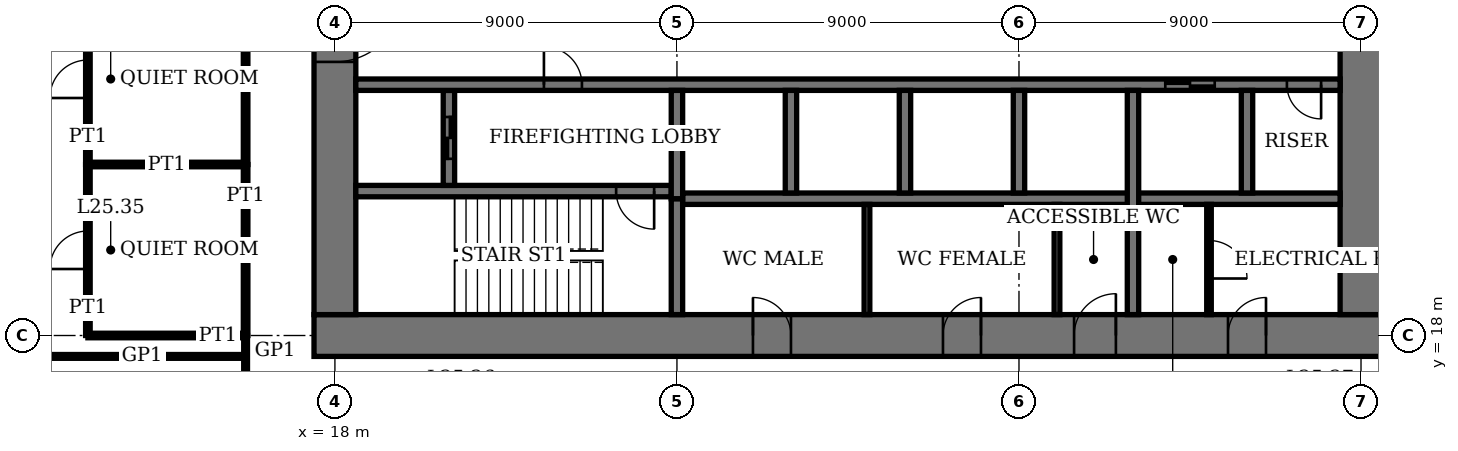
"""IFC4 building model, lengths in metres.
Left out: names, types, materials, properties, quantities, classifications, styles, units other than length and angle.
Written with IfcOpenShell. Run it as: python <this file> out.ifc"""

import sys

from ifc_helpers import new_model, si_unit, direction, frame, frame_2d, origin, place, context, subcontext, project, spatial, rectangle, extrude, element, fill, save


model = new_model("IFC4")
c1 = context("Model", 3, precision=1e-05, world=origin(), true_north=direction((0.0, 1.0)))
c2 = subcontext(c1, "Body", "Model", "MODEL_VIEW")
j1 = project(units=[si_unit("LENGTHUNIT", "METRE"), si_unit("PLANEANGLEUNIT", "RADIAN")], contexts=[c1])
p1 = place(None, origin())
s1 = spatial("IfcSite", under=j1, at=p1, CompositionType="ELEMENT")
p2 = place(p1, origin())
s2 = spatial("IfcBuilding", under=s1, at=p2, CompositionType="ELEMENT")
p3 = place(p2, frame((0.0, 0.0, 105.0)))
s3 = spatial("IfcBuildingStorey", under=s2, at=p3, CompositionType="ELEMENT", Elevation=105.0)
p4 = place(p3, frame((17.45, 18.0, 0.0), z_axis=(0.0, 0.0, 1.0), x_axis=(1.0, 0.0, 0.0)))
e1 = element("IfcWall", 1, at=p4, inside=s3, PredefinedType="SHEAR", context=c2, shape_type="SweptSolid", body=[
    extrude(rectangle(XDim=28.1, YDim=1.1, at=frame_2d((14.05, 0.0))), origin(), (0.0, 0.0, 1.0), 4.0),
])
p5 = place(p4, frame((11.55, 0.0, 0.0)))
e2 = element("IfcOpeningElement", 2, at=p5, cuts=e1, PredefinedType="OPENING", context=c2, shape_type="SweptSolid", body=[
    extrude(rectangle(XDim=1.0, YDim=2.4, at=frame_2d((0.5, 1.2))), frame((0.0, 0.56, 0.0), z_axis=(0.0, -1.0, 0.0), x_axis=(1.0, 0.0, 0.0)), (0.0, 0.0, 1.0), 1.12),
])
p6 = place(p4, frame((16.55, 0.0, 0.0)))
e3 = element("IfcOpeningElement", 3, at=p6, cuts=e1, PredefinedType="OPENING", context=c2, shape_type="SweptSolid", body=[
    extrude(rectangle(XDim=1.0, YDim=2.4, at=frame_2d((0.5, 1.2))), frame((0.0, 0.56, 0.0), z_axis=(0.0, -1.0, 0.0), x_axis=(1.0, 0.0, 0.0)), (0.0, 0.0, 1.0), 1.12),
])
p7 = place(p4, frame((20.0, 0.0, 0.0)))
e4 = element("IfcOpeningElement", 4, at=p7, cuts=e1, PredefinedType="OPENING", context=c2, shape_type="SweptSolid", body=[
    extrude(rectangle(XDim=1.1, YDim=2.4, at=frame_2d((0.55, 1.2))), frame((0.0, 0.56, 0.0), z_axis=(0.0, -1.0, 0.0), x_axis=(1.0, 0.0, 0.0)), (0.0, 0.0, 1.0), 1.12),
])
p8 = place(p4, frame((24.05, 0.0, 0.0)))
e5 = element("IfcOpeningElement", 5, at=p8, cuts=e1, PredefinedType="OPENING", context=c2, shape_type="SweptSolid", body=[
    extrude(rectangle(XDim=1.0, YDim=2.4, at=frame_2d((0.5, 1.2))), frame((0.0, 0.56, 0.0), z_axis=(0.0, -1.0, 0.0), x_axis=(1.0, 0.0, 0.0)), (0.0, 0.0, 1.0), 1.12),
])
p9 = place(p3, frame((18.0, 35.45, 0.0), z_axis=(0.0, 0.0, 1.0), x_axis=(0.0, -1.0, 0.0)))
e6 = element("IfcWall", 6, at=p9, inside=s3, PredefinedType="SHEAR", context=c2, shape_type="SweptSolid", body=[
    extrude(rectangle(XDim=16.9, YDim=1.1, at=frame_2d((8.45, 0.0))), origin(), (0.0, 0.0, 1.0), 4.0),
])
p10 = place(p9, frame((8.45, 0.0, 0.0)))
e7 = element("IfcOpeningElement", 7, at=p10, cuts=e6, PredefinedType="OPENING", context=c2, shape_type="SweptSolid", body=[
    extrude(rectangle(XDim=1.8, YDim=2.4, at=frame_2d((0.9, 1.2))), frame((0.0, 0.56, 0.0), z_axis=(0.0, -1.0, 0.0), x_axis=(1.0, 0.0, 0.0)), (0.0, 0.0, 1.0), 1.12),
])
p11 = place(p3, frame((45.0, 18.55, 0.0), z_axis=(0.0, 0.0, 1.0), x_axis=(0.0, 1.0, 0.0)))
e8 = element("IfcWall", 8, at=p11, inside=s3, PredefinedType="SHEAR", context=c2, shape_type="SweptSolid", body=[
    extrude(rectangle(XDim=16.9, YDim=1.1, at=frame_2d((8.45, 0.0))), origin(), (0.0, 0.0, 1.0), 4.0),
])
p12 = place(p11, frame((8.45, 0.0, 0.0)))
e9 = element("IfcOpeningElement", 9, at=p12, cuts=e8, PredefinedType="OPENING", context=c2, shape_type="SweptSolid", body=[
    extrude(rectangle(XDim=1.8, YDim=2.4, at=frame_2d((0.9, 1.2))), frame((0.0, 0.56, 0.0), z_axis=(0.0, -1.0, 0.0), x_axis=(1.0, 0.0, 0.0)), (0.0, 0.0, 1.0), 1.12),
])
p13 = place(p3, frame((18.55, 21.8, 0.0), z_axis=(0.0, 0.0, 1.0), x_axis=(1.0, 0.0, 0.0)))
e10 = element("IfcWall", 10, at=p13, inside=s3, PredefinedType="SHEAR", context=c2, shape_type="SweptSolid", body=[
    extrude(rectangle(XDim=8.3, YDim=0.3, at=frame_2d((4.15, 0.0))), origin(), (0.0, 0.0, 1.0), 4.0),
])
p14 = place(p13, frame((6.85, 0.0, 0.0)))
e11 = element("IfcOpeningElement", 11, at=p14, cuts=e10, PredefinedType="OPENING", context=c2, shape_type="SweptSolid", body=[
    extrude(rectangle(XDim=1.0, YDim=2.4, at=frame_2d((0.5, 1.2))), frame((0.0, 0.16, 0.0), z_axis=(0.0, -1.0, 0.0), x_axis=(1.0, 0.0, 0.0)), (0.0, 0.0, 1.0), 0.32),
])
p15 = place(p3, frame((27.0, 18.55, 0.0), z_axis=(0.0, 0.0, 1.0), x_axis=(0.0, 1.0, 0.0)))
e12 = element("IfcWall", 12, at=p15, inside=s3, PredefinedType="SHEAR", context=c2, shape_type="SweptSolid", body=[
    extrude(rectangle(XDim=3.05, YDim=0.3, at=frame_2d((1.525, 0.0))), origin(), (0.0, 0.0, 1.0), 4.0),
])
p16 = place(p3, frame((21.0, 21.95, 0.0), z_axis=(0.0, 0.0, 1.0), x_axis=(0.0, 1.0, 0.0)))
e13 = element("IfcWall", 13, at=p16, inside=s3, PredefinedType="SHEAR", context=c2, shape_type="SweptSolid", body=[
    extrude(rectangle(XDim=2.5, YDim=0.3, at=frame_2d((1.25, 0.0))), origin(), (0.0, 0.0, 1.0), 4.0),
])
p17 = place(p16, frame((0.7, 0.0, 0.0)))
e14 = element("IfcOpeningElement", 14, at=p17, cuts=e13, PredefinedType="OPENING", context=c2, shape_type="SweptSolid", body=[
    extrude(rectangle(XDim=1.1, YDim=2.4, at=frame_2d((0.55, 1.2))), frame((0.0, 0.16, 0.0), z_axis=(0.0, -1.0, 0.0), x_axis=(1.0, 0.0, 0.0)), (0.0, 0.0, 1.0), 0.32),
])
p18 = place(p3, frame((18.55, 24.6, 0.0), z_axis=(0.0, 0.0, 1.0), x_axis=(1.0, 0.0, 0.0)))
e15 = element("IfcWall", 15, at=p18, inside=s3, PredefinedType="SHEAR", context=c2, shape_type="SweptSolid", body=[
    extrude(rectangle(XDim=25.9, YDim=0.3, at=frame_2d((12.95, 0.0))), origin(), (0.0, 0.0, 1.0), 4.0),
])
p19 = place(p18, frame((4.95, 0.0, 0.0)))
e16 = element("IfcOpeningElement", 16, at=p19, cuts=e15, PredefinedType="OPENING", context=c2, shape_type="SweptSolid", body=[
    extrude(rectangle(XDim=1.0, YDim=2.4, at=frame_2d((0.5, 1.2))), frame((0.0, 0.16, 0.0), z_axis=(0.0, -1.0, 0.0), x_axis=(1.0, 0.0, 0.0)), (0.0, 0.0, 1.0), 0.32),
])
p20 = place(p18, frame((24.5, 0.0, 0.0)))
e17 = element("IfcOpeningElement", 17, at=p20, cuts=e15, PredefinedType="OPENING", context=c2, shape_type="SweptSolid", body=[
    extrude(rectangle(XDim=0.9, YDim=2.1, at=frame_2d((0.45, 1.05))), frame((0.0, 0.16, 0.0), z_axis=(0.0, -1.0, 0.0), x_axis=(1.0, 0.0, 0.0)), (0.0, 0.0, 1.0), 0.32),
])
p21 = place(p18, frame((21.3, 0.0, 0.0)))
e18 = element("IfcOpeningElement", 18, at=p21, cuts=e15, PredefinedType="OPENING", context=c2, shape_type="SweptSolid", body=[
    extrude(rectangle(XDim=1.3, YDim=2.4, at=frame_2d((0.65, 1.2))), frame((0.0, 0.16, 0.0), z_axis=(0.0, -1.0, 0.0), x_axis=(1.0, 0.0, 0.0)), (0.0, 0.0, 1.0), 0.32),
])
p22 = place(p3, frame((27.15, 21.6, 0.0), z_axis=(0.0, 0.0, 1.0), x_axis=(1.0, 0.0, 0.0)))
e19 = element("IfcWall", 19, at=p22, inside=s3, PredefinedType="SHEAR", context=c2, shape_type="SweptSolid", body=[
    extrude(rectangle(XDim=17.3, YDim=0.3, at=frame_2d((8.65, 0.0))), origin(), (0.0, 0.0, 1.0), 4.0),
])
for number, where, z_axis, x_axis in (
    (20, (30.0, 21.75, 0.0), (0.0, 0.0, 1.0), (0.0, 1.0, 0.0)),
    (21, (33.0, 21.75, 0.0), (0.0, 0.0, 1.0), (0.0, 1.0, 0.0)),
    (22, (36.0, 21.75, 0.0), (0.0, 0.0, 1.0), (0.0, 1.0, 0.0)),
):
    element("IfcWall", number, at=place(p3, frame(where, z_axis=z_axis, x_axis=x_axis)), inside=s3, PredefinedType="SHEAR", context=c2, shape_type="SweptSolid", body=[
        extrude(rectangle(XDim=2.7, YDim=0.3, at=frame_2d((1.35, 0.0))), origin(), (0.0, 0.0, 1.0), 4.0),
    ])
p23 = place(p3, frame((39.0, 18.55, 0.0), z_axis=(0.0, 0.0, 1.0), x_axis=(0.0, 1.0, 0.0)))
e23 = element("IfcWall", 23, at=p23, inside=s3, PredefinedType="SHEAR", context=c2, shape_type="SweptSolid", body=[
    extrude(rectangle(XDim=5.9, YDim=0.3, at=frame_2d((2.95, 0.0))), origin(), (0.0, 0.0, 1.0), 4.0),
])
p24 = place(p3, frame((42.0, 21.75, 0.0), z_axis=(0.0, 0.0, 1.0), x_axis=(0.0, 1.0, 0.0)))
e24 = element("IfcWall", 24, at=p24, inside=s3, PredefinedType="SHEAR", context=c2, shape_type="SweptSolid", body=[
    extrude(rectangle(XDim=2.7, YDim=0.3, at=frame_2d((1.35, 0.0))), origin(), (0.0, 0.0, 1.0), 4.0),
])
p25 = place(p3, frame((27.0, 21.6, 0.0), z_axis=(0.0, 0.0, 1.0), x_axis=(0.0, 1.0, 0.0)))
e25 = element("IfcWall", 25, at=p25, inside=s3, PredefinedType="SHEAR", context=c2, shape_type="SweptSolid", body=[
    extrude(rectangle(XDim=2.85, YDim=0.3, at=frame_2d((1.425, 0.0))), origin(), (0.0, 0.0, 1.0), 4.0),
])
p26 = place(p3, frame((10.0, 17.45, 0.0), z_axis=(0.0, 0.0, 1.0), x_axis=(1.0, 0.0, 0.0)))
e26 = element("IfcWall", 26, at=p26, inside=s3, PredefinedType="PARTITIONING", context=c2, shape_type="SweptSolid", body=[
    extrude(rectangle(XDim=5.65, YDim=0.1, at=frame_2d((2.825, 0.0))), origin(), (0.0, 0.0, 1.0), 3.75),
])
p27 = place(p3, frame((11.5, 18.0, 0.0), z_axis=(0.0, 0.0, 1.0), x_axis=(1.0, 0.0, 0.0)))
e27 = element("IfcWall", 27, at=p27, inside=s3, PredefinedType="PARTITIONING", context=c2, shape_type="SweptSolid", body=[
    extrude(rectangle(XDim=4.15, YDim=0.12, at=frame_2d((2.075, 0.0))), origin(), (0.0, 0.0, 1.0), 3.05),
])
p28 = place(p3, frame((11.5, 22.5, 0.0), z_axis=(0.0, 0.0, 1.0), x_axis=(1.0, 0.0, 0.0)))
e28 = element("IfcWall", 28, at=p28, inside=s3, PredefinedType="PARTITIONING", context=c2, shape_type="SweptSolid", body=[
    extrude(rectangle(XDim=4.15, YDim=0.12, at=frame_2d((2.075, 0.0))), origin(), (0.0, 0.0, 1.0), 3.1),
])
p29 = place(p3, frame((11.5, 18.0, 0.0), z_axis=(0.0, 0.0, 1.0), x_axis=(0.0, 1.0, 0.0)))
e29 = element("IfcWall", 29, at=p29, inside=s3, PredefinedType="PARTITIONING", context=c2, shape_type="SweptSolid", body=[
    extrude(rectangle(XDim=4.5, YDim=0.12, at=frame_2d((2.25, 0.0))), origin(), (0.0, 0.0, 1.0), 3.75),
])
p30 = place(p29, frame((1.75, 0.0, 0.0)))
e30 = element("IfcOpeningElement", 30, at=p30, cuts=e29, PredefinedType="OPENING", context=c2, shape_type="SweptSolid", body=[
    extrude(rectangle(XDim=1.0, YDim=2.4, at=frame_2d((0.5, 1.2))), frame((0.0, 0.07, 0.0), z_axis=(0.0, -1.0, 0.0), x_axis=(1.0, 0.0, 0.0)), (0.0, 0.0, 1.0), 0.14),
])
p31 = place(p3, frame((11.5, 22.5, 0.0), z_axis=(0.0, 0.0, 1.0), x_axis=(0.0, 1.0, 0.0)))
e31 = element("IfcWall", 31, at=p31, inside=s3, PredefinedType="PARTITIONING", context=c2, shape_type="SweptSolid", body=[
    extrude(rectangle(XDim=4.5, YDim=0.12, at=frame_2d((2.25, 0.0))), origin(), (0.0, 0.0, 1.0), 3.75),
])
p32 = place(p31, frame((1.75, 0.0, 0.0)))
e32 = element("IfcOpeningElement", 32, at=p32, cuts=e31, PredefinedType="OPENING", context=c2, shape_type="SweptSolid", body=[
    extrude(rectangle(XDim=1.0, YDim=2.4, at=frame_2d((0.5, 1.2))), frame((0.0, 0.07, 0.0), z_axis=(0.0, -1.0, 0.0), x_axis=(1.0, 0.0, 0.0)), (0.0, 0.0, 1.0), 0.14),
])
for number, where, z_axis, x_axis in (
    (33, (15.65, 18.0, 0.0), (0.0, 0.0, 1.0), (0.0, 1.0, 0.0)),
    (34, (15.65, 22.5, 0.0), (0.0, 0.0, 1.0), (0.0, 1.0, 0.0)),
):
    element("IfcWall", number, at=place(p3, frame(where, z_axis=z_axis, x_axis=x_axis)), inside=s3, PredefinedType="PARTITIONING", context=c2, shape_type="SweptSolid", body=[
        extrude(rectangle(XDim=4.5, YDim=0.12, at=frame_2d((2.25, 0.0))), origin(), (0.0, 0.0, 1.0), 3.75),
    ])
p33 = place(p3, frame((15.65, 15.65, 0.0), z_axis=(0.0, 0.0, 1.0), x_axis=(0.0, 1.0, 0.0)))
e35 = element("IfcWall", 35, at=p33, inside=s3, PredefinedType="PARTITIONING", context=c2, shape_type="SweptSolid", body=[
    extrude(rectangle(XDim=2.35, YDim=0.1, at=frame_2d((1.175, 0.0))), origin(), (0.0, 0.0, 1.0), 3.75),
])
for number, where, z_axis, x_axis in (
    (36, (32.0, 18.55, 0.0), (0.0, 0.0, 1.0), (0.0, 1.0, 0.0)),
    (37, (37.0, 18.55, 0.0), (0.0, 0.0, 1.0), (0.0, 1.0, 0.0)),
):
    element("IfcWall", number, at=place(p3, frame(where, z_axis=z_axis, x_axis=x_axis)), inside=s3, PredefinedType="PARTITIONING", context=c2, shape_type="SweptSolid", body=[
        extrude(rectangle(XDim=2.9, YDim=0.15, at=frame_2d((1.45, 0.0))), origin(), (0.0, 0.0, 1.0), 3.75),
    ])
p34 = place(p3, frame((41.0, 18.55, 0.0), z_axis=(0.0, 0.0, 1.0), x_axis=(0.0, 1.0, 0.0)))
e38 = element("IfcWall", 38, at=p34, inside=s3, PredefinedType="PARTITIONING", context=c2, shape_type="SweptSolid", body=[
    extrude(rectangle(XDim=2.9, YDim=0.12, at=frame_2d((1.45, 0.0))), origin(), (0.0, 0.0, 1.0), 3.75),
])
p35 = place(p34, frame((0.95, 0.0, 0.0)))
e39 = element("IfcOpeningElement", 39, at=p35, cuts=e38, PredefinedType="OPENING", context=c2, shape_type="SweptSolid", body=[
    extrude(rectangle(XDim=1.0, YDim=2.4, at=frame_2d((0.5, 1.2))), frame((0.0, 0.07, 0.0), z_axis=(0.0, -1.0, 0.0), x_axis=(1.0, 0.0, 0.0)), (0.0, 0.0, 1.0), 0.14),
])
p36 = place(p10, origin())
e40 = element("IfcDoor", 40, at=p36, inside=s3, OperationType="DOUBLE_DOOR_DOUBLE_SWING", PredefinedType="DOOR", context=c2, shape_type="SweptSolid", body=[
    extrude(rectangle(XDim=1.8, YDim=2.4, at=frame_2d((0.9, 1.2))), frame((0.0, 0.03, 0.0), z_axis=(0.0, -1.0, 0.0), x_axis=(1.0, 0.0, 0.0)), (0.0, 0.0, 1.0), 0.06),
    extrude(rectangle(XDim=0.04, YDim=2.4, at=frame_2d((0.02, 1.2))), frame((0.0, 0.55, 0.0), z_axis=(0.0, -1.0, 0.0), x_axis=(1.0, 0.0, 0.0)), (0.0, 0.0, 1.0), 1.1),
    extrude(rectangle(XDim=0.04, YDim=2.4, at=frame_2d((1.78, 1.2))), frame((0.0, 0.55, 0.0), z_axis=(0.0, -1.0, 0.0), x_axis=(1.0, 0.0, 0.0)), (0.0, 0.0, 1.0), 1.1),
    extrude(rectangle(XDim=1.8, YDim=0.04, at=frame_2d((0.9, 2.38))), frame((0.0, 0.55, 0.0), z_axis=(0.0, -1.0, 0.0), x_axis=(1.0, 0.0, 0.0)), (0.0, 0.0, 1.0), 1.1),
])
fill(e7, e40)
p37 = place(p5, origin())
e41 = element("IfcDoor", 41, at=p37, inside=s3, OperationType="SINGLE_SWING_RIGHT", PredefinedType="DOOR", context=c2, shape_type="SweptSolid", body=[
    extrude(rectangle(XDim=1.0, YDim=2.4, at=frame_2d((0.5, 1.2))), frame((0.0, 0.025, 0.0), z_axis=(0.0, -1.0, 0.0), x_axis=(1.0, 0.0, 0.0)), (0.0, 0.0, 1.0), 0.05),
    extrude(rectangle(XDim=0.04, YDim=2.4, at=frame_2d((0.02, 1.2))), frame((0.0, 0.4, 0.0), z_axis=(0.0, -1.0, 0.0), x_axis=(1.0, 0.0, 0.0)), (0.0, 0.0, 1.0), 0.8),
    extrude(rectangle(XDim=0.04, YDim=2.4, at=frame_2d((0.98, 1.2))), frame((0.0, 0.4, 0.0), z_axis=(0.0, -1.0, 0.0), x_axis=(1.0, 0.0, 0.0)), (0.0, 0.0, 1.0), 0.8),
    extrude(rectangle(XDim=1.0, YDim=0.04, at=frame_2d((0.5, 2.38))), frame((0.0, 0.4, 0.0), z_axis=(0.0, -1.0, 0.0), x_axis=(1.0, 0.0, 0.0)), (0.0, 0.0, 1.0), 0.8),
])
fill(e2, e41)
p38 = place(p6, origin())
e42 = element("IfcDoor", 42, at=p38, inside=s3, OperationType="SINGLE_SWING_LEFT", PredefinedType="DOOR", context=c2, shape_type="SweptSolid", body=[
    extrude(rectangle(XDim=1.0, YDim=2.4, at=frame_2d((0.5, 1.2))), frame((0.0, 0.025, 0.0), z_axis=(0.0, -1.0, 0.0), x_axis=(1.0, 0.0, 0.0)), (0.0, 0.0, 1.0), 0.05),
    extrude(rectangle(XDim=0.04, YDim=2.4, at=frame_2d((0.02, 1.2))), frame((0.0, 0.4, 0.0), z_axis=(0.0, -1.0, 0.0), x_axis=(1.0, 0.0, 0.0)), (0.0, 0.0, 1.0), 0.8),
    extrude(rectangle(XDim=0.04, YDim=2.4, at=frame_2d((0.98, 1.2))), frame((0.0, 0.4, 0.0), z_axis=(0.0, -1.0, 0.0), x_axis=(1.0, 0.0, 0.0)), (0.0, 0.0, 1.0), 0.8),
    extrude(rectangle(XDim=1.0, YDim=0.04, at=frame_2d((0.5, 2.38))), frame((0.0, 0.4, 0.0), z_axis=(0.0, -1.0, 0.0), x_axis=(1.0, 0.0, 0.0)), (0.0, 0.0, 1.0), 0.8),
])
fill(e3, e42)
p39 = place(p7, origin())
e43 = element("IfcDoor", 43, at=p39, inside=s3, OperationType="SINGLE_SWING_LEFT", PredefinedType="DOOR", context=c2, shape_type="SweptSolid", body=[
    extrude(rectangle(XDim=1.1, YDim=2.4, at=frame_2d((0.55, 1.2))), frame((0.0, 0.025, 0.0), z_axis=(0.0, -1.0, 0.0), x_axis=(1.0, 0.0, 0.0)), (0.0, 0.0, 1.0), 0.05),
    extrude(rectangle(XDim=0.04, YDim=2.4, at=frame_2d((0.02, 1.2))), frame((0.0, 0.44, 0.0), z_axis=(0.0, -1.0, 0.0), x_axis=(1.0, 0.0, 0.0)), (0.0, 0.0, 1.0), 0.88),
    extrude(rectangle(XDim=0.04, YDim=2.4, at=frame_2d((1.08, 1.2))), frame((0.0, 0.44, 0.0), z_axis=(0.0, -1.0, 0.0), x_axis=(1.0, 0.0, 0.0)), (0.0, 0.0, 1.0), 0.88),
    extrude(rectangle(XDim=1.1, YDim=0.04, at=frame_2d((0.55, 2.38))), frame((0.0, 0.44, 0.0), z_axis=(0.0, -1.0, 0.0), x_axis=(1.0, 0.0, 0.0)), (0.0, 0.0, 1.0), 0.88),
])
fill(e4, e43)
p40 = place(p8, origin())
e44 = element("IfcDoor", 44, at=p40, inside=s3, OperationType="SINGLE_SWING_LEFT", PredefinedType="DOOR", context=c2, shape_type="SweptSolid", body=[
    extrude(rectangle(XDim=1.0, YDim=2.4, at=frame_2d((0.5, 1.2))), frame((0.0, 0.025, 0.0), z_axis=(0.0, -1.0, 0.0), x_axis=(1.0, 0.0, 0.0)), (0.0, 0.0, 1.0), 0.05),
    extrude(rectangle(XDim=0.04, YDim=2.4, at=frame_2d((0.02, 1.2))), frame((0.0, 0.4, 0.0), z_axis=(0.0, -1.0, 0.0), x_axis=(1.0, 0.0, 0.0)), (0.0, 0.0, 1.0), 0.8),
    extrude(rectangle(XDim=0.04, YDim=2.4, at=frame_2d((0.98, 1.2))), frame((0.0, 0.4, 0.0), z_axis=(0.0, -1.0, 0.0), x_axis=(1.0, 0.0, 0.0)), (0.0, 0.0, 1.0), 0.8),
    extrude(rectangle(XDim=1.0, YDim=0.04, at=frame_2d((0.5, 2.38))), frame((0.0, 0.4, 0.0), z_axis=(0.0, -1.0, 0.0), x_axis=(1.0, 0.0, 0.0)), (0.0, 0.0, 1.0), 0.8),
])
fill(e5, e44)
p41 = place(p14, origin())
e45 = element("IfcDoor", 45, at=p41, inside=s3, OperationType="SINGLE_SWING_RIGHT", PredefinedType="DOOR", context=c2, shape_type="SweptSolid", body=[
    extrude(rectangle(XDim=1.0, YDim=2.4, at=frame_2d((0.5, 1.2))), frame((0.0, 0.03, 0.0), z_axis=(0.0, -1.0, 0.0), x_axis=(1.0, 0.0, 0.0)), (0.0, 0.0, 1.0), 0.06),
])
fill(e11, e45)
p42 = place(p19, origin())
e46 = element("IfcDoor", 46, at=p42, inside=s3, OperationType="SINGLE_SWING_RIGHT", PredefinedType="DOOR", context=c2, shape_type="SweptSolid", body=[
    extrude(rectangle(XDim=1.0, YDim=2.4, at=frame_2d((0.5, 1.2))), frame((0.0, 0.03, 0.0), z_axis=(0.0, -1.0, 0.0), x_axis=(1.0, 0.0, 0.0)), (0.0, 0.0, 1.0), 0.06),
])
fill(e16, e46)
p43 = place(p20, origin())
e47 = element("IfcDoor", 47, at=p43, inside=s3, OperationType="SINGLE_SWING_RIGHT", PredefinedType="DOOR", context=c2, shape_type="SweptSolid", body=[
    extrude(rectangle(XDim=0.9, YDim=2.1, at=frame_2d((0.45, 1.05))), frame((0.0, 0.03, 0.0), z_axis=(0.0, -1.0, 0.0), x_axis=(1.0, 0.0, 0.0)), (0.0, 0.0, 1.0), 0.06),
])
fill(e17, e47)
p44 = place(p30, origin())
e48 = element("IfcDoor", 48, at=p44, inside=s3, OperationType="SINGLE_SWING_RIGHT", PredefinedType="DOOR", context=c2, shape_type="SweptSolid", body=[
    extrude(rectangle(XDim=1.0, YDim=2.4, at=frame_2d((0.5, 1.2))), frame((0.0, 0.025, 0.0), z_axis=(0.0, -1.0, 0.0), x_axis=(1.0, 0.0, 0.0)), (0.0, 0.0, 1.0), 0.05),
])
fill(e30, e48)
p45 = place(p32, origin())
e49 = element("IfcDoor", 49, at=p45, inside=s3, OperationType="SINGLE_SWING_RIGHT", PredefinedType="DOOR", context=c2, shape_type="SweptSolid", body=[
    extrude(rectangle(XDim=1.0, YDim=2.4, at=frame_2d((0.5, 1.2))), frame((0.0, 0.025, 0.0), z_axis=(0.0, -1.0, 0.0), x_axis=(1.0, 0.0, 0.0)), (0.0, 0.0, 1.0), 0.05),
])
fill(e32, e49)
p46 = place(p35, origin())
e50 = element("IfcDoor", 50, at=p46, inside=s3, OperationType="SINGLE_SWING_LEFT", PredefinedType="DOOR", context=c2, shape_type="SweptSolid", body=[
    extrude(rectangle(XDim=1.0, YDim=2.4, at=frame_2d((0.5, 1.2))), frame((0.0, 0.03, 0.0), z_axis=(0.0, -1.0, 0.0), x_axis=(1.0, 0.0, 0.0)), (0.0, 0.0, 1.0), 0.06),
])
fill(e39, e50)
p47 = place(p21, origin())
e51 = element("IfcDoor", 51, at=p47, inside=s3, OperationType="DOUBLE_DOOR_SLIDING", PredefinedType="DOOR", context=c2, shape_type="SweptSolid", body=[
    extrude(rectangle(XDim=1.3, YDim=2.4, at=frame_2d((0.65, 1.2))), frame((0.0, 0.02, 0.0), z_axis=(0.0, -1.0, 0.0), x_axis=(1.0, 0.0, 0.0)), (0.0, 0.0, 1.0), 0.04),
])
fill(e18, e51)
p48 = place(p17, origin())
e52 = element("IfcDoor", 52, at=p48, inside=s3, OperationType="DOUBLE_DOOR_SLIDING", PredefinedType="DOOR", context=c2, shape_type="SweptSolid", body=[
    extrude(rectangle(XDim=1.1, YDim=2.4, at=frame_2d((0.55, 1.2))), frame((0.0, 0.03, 0.0), z_axis=(0.0, -1.0, 0.0), x_axis=(1.0, 0.0, 0.0)), (0.0, 0.0, 1.0), 0.06),
])
fill(e14, e52)
save(model, sys.argv[1])
